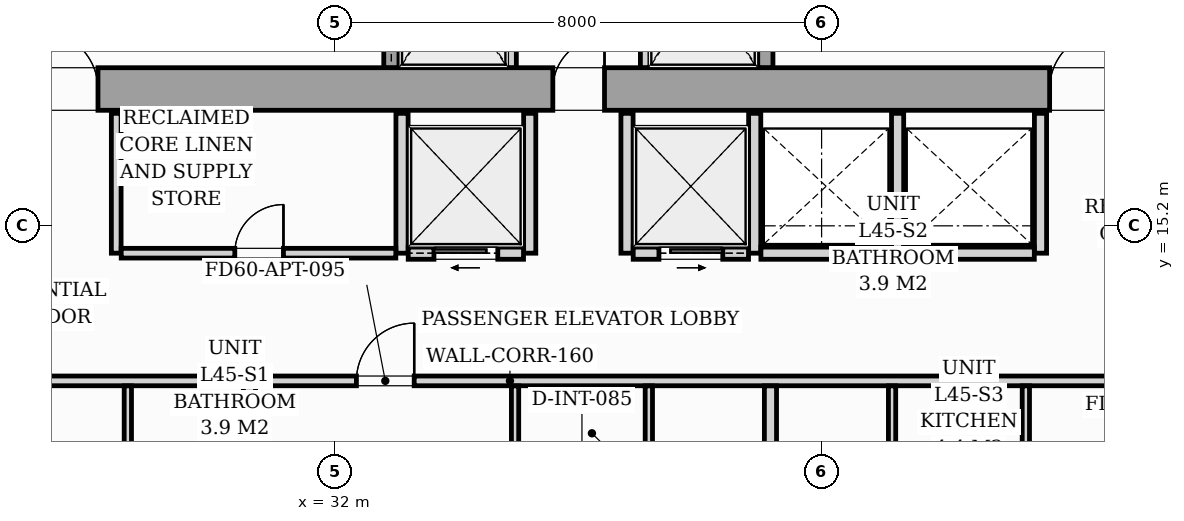
"""IFC4 building model, lengths in metres.
Left out: names, types, materials, properties, quantities, classifications, styles, units other than length and angle.
Written with IfcOpenShell. Run it as: python <this file> out.ifc"""

import sys

from ifc_helpers import new_model, si_unit, direction, frame, frame_2d, origin, origin_2d, place, context, subcontext, project, spatial, rectangle, i_section, extrude, source, transform, mapped, element, fill, save


model = new_model("IFC4")
c1 = context("Model", 3, precision=1e-05, world=origin(), true_north=direction((0.0, 1.0)))
c2 = subcontext(c1, "Body", "Model", "MODEL_VIEW")
j1 = project(units=[si_unit("LENGTHUNIT", "METRE"), si_unit("PLANEANGLEUNIT", "RADIAN")], contexts=[c1])
p1 = place(None, origin())
s1 = spatial("IfcSite", under=j1, at=p1, CompositionType="ELEMENT")
p2 = place(p1, origin())
s2 = spatial("IfcBuilding", under=s1, at=p2, CompositionType="ELEMENT")
p3 = place(p2, frame((0.0, 0.0, 156.6)))
s3 = spatial("IfcBuildingStorey", under=s2, at=p3, CompositionType="ELEMENT", Elevation=156.6)
m1 = source(origin(), c2, "Body", "SweptSolid", [
    extrude(i_section(OverallWidth=0.421, OverallDepth=0.465, WebThickness=0.045, FlangeThickness=0.073, FilletRadius=0.018, at=origin_2d()), origin(), (0.0, 0.0, 1.0), 3.196),
])
for number, where, z_axis, x_axis in (
    (1, (33.12, 17.4, 0.002), (0.0, 0.0, 1.0), (1.0, 0.0, 0.0)),
    (2, (38.88, 17.4, 0.002), (0.0, 0.0, 1.0), (1.0, 0.0, 0.0)),
):
    element("IfcColumn", number, at=place(p3, frame(where, z_axis=z_axis, x_axis=x_axis)), inside=s3, PredefinedType="PILASTER", context=c2, shape_type="MappedRepresentation", body=[
        mapped(m1, transform((0.0, 0.0, 0.0), scale=1.0)),
    ])
p4 = place(p3, frame((26.1, 17.45, 0.0), z_axis=(0.0, 0.0, 1.0), x_axis=(1.0, 0.0, 0.0)))
e3 = element("IfcWall", 3, at=p4, inside=s3, PredefinedType="SHEAR", context=c2, shape_type="SweptSolid", body=[
    extrude(rectangle(XDim=19.8, YDim=0.7, at=frame_2d((9.9, 0.0))), origin(), (0.0, 0.0, 1.0), 3.2),
])
p5 = place(p4, frame((1.05, 0.0, 0.0)))
e4 = element("IfcOpeningElement", 4, at=p5, cuts=e3, PredefinedType="OPENING", context=c2, shape_type="SweptSolid", body=[
    extrude(rectangle(XDim=0.95, YDim=2.06, at=frame_2d((0.475, 1.03))), frame((0.0, 0.36, 0.0), z_axis=(0.0, -1.0, 0.0), x_axis=(1.0, 0.0, 0.0)), (0.0, 0.0, 1.0), 0.72),
])
p6 = place(p4, frame((9.48, 0.0, 0.0)))
e5 = element("IfcOpeningElement", 5, at=p6, cuts=e3, PredefinedType="OPENING", context=c2, shape_type="SweptSolid", body=[
    extrude(rectangle(XDim=0.85, YDim=2.0, at=frame_2d((0.425, 1.0))), frame((0.0, 0.36, 0.0), z_axis=(0.0, -1.0, 0.0), x_axis=(1.0, 0.0, 0.0)), (0.0, 0.0, 1.0), 0.72),
])
p7 = place(p4, frame((17.65, 0.0, 0.0)))
e6 = element("IfcOpeningElement", 6, at=p7, cuts=e3, PredefinedType="OPENING", context=c2, shape_type="SweptSolid", body=[
    extrude(rectangle(XDim=0.95, YDim=2.06, at=frame_2d((0.475, 1.03))), frame((0.0, 0.36, 0.0), z_axis=(0.0, -1.0, 0.0), x_axis=(1.0, 0.0, 0.0)), (0.0, 0.0, 1.0), 0.72),
])
p8 = place(p3, frame((32.925, 17.802, 0.0), z_axis=(0.0, 0.0, 1.0), x_axis=(0.0, 1.0, 0.0)))
e7 = element("IfcWall", 7, at=p8, inside=s3, PredefinedType="SOLIDWALL", context=c2, shape_type="SweptSolid", body=[
    extrude(rectangle(XDim=2.646, YDim=0.25, at=frame_2d((1.323, 0.0))), origin(), (0.0, 0.0, 1.0), 3.2),
])
p9 = place(p8, frame((0.598, 0.0, 0.0)))
e8 = element("IfcOpeningElement", 8, at=p9, cuts=e7, PredefinedType="OPENING", context=c2, shape_type="SweptSolid", body=[
    extrude(rectangle(XDim=1.1, YDim=2.08, at=frame_2d((0.55, 1.04))), frame((0.0, 0.135, 0.0), z_axis=(0.0, -1.0, 0.0), x_axis=(1.0, 0.0, 0.0)), (0.0, 0.0, 1.0), 0.27),
])
for number, where, z_axis, x_axis in (
    (9, (34.9, 17.802, 0.0), (0.0, 0.0, 1.0), (0.0, 1.0, 0.0)),
    (10, (37.1, 17.802, 0.0), (0.0, 0.0, 1.0), (0.0, 1.0, 0.0)),
):
    element("IfcWall", number, at=place(p3, frame(where, z_axis=z_axis, x_axis=x_axis)), inside=s3, PredefinedType="PARTITIONING", context=c2, shape_type="SweptSolid", body=[
        extrude(rectangle(XDim=2.646, YDim=0.16, at=frame_2d((1.323, 0.0))), origin(), (0.0, 0.0, 1.0), 2.94),
    ])
p10 = place(p3, frame((39.075, 17.802, 0.0), z_axis=(0.0, 0.0, 1.0), x_axis=(0.0, 1.0, 0.0)))
e11 = element("IfcWall", 11, at=p10, inside=s3, PredefinedType="SOLIDWALL", context=c2, shape_type="SweptSolid", body=[
    extrude(rectangle(XDim=2.646, YDim=0.25, at=frame_2d((1.323, 0.0))), origin(), (0.0, 0.0, 1.0), 3.2),
])
p11 = place(p10, frame((0.598, 0.0, 0.0)))
e12 = element("IfcOpeningElement", 12, at=p11, cuts=e11, PredefinedType="OPENING", context=c2, shape_type="SweptSolid", body=[
    extrude(rectangle(XDim=1.1, YDim=2.08, at=frame_2d((0.55, 1.04))), frame((0.0, 0.135, 0.0), z_axis=(0.0, -1.0, 0.0), x_axis=(1.0, 0.0, 0.0)), (0.0, 0.0, 1.0), 0.27),
])
p12 = place(p3, frame((28.4, 14.75, 0.0), z_axis=(0.0, 0.0, 1.0), x_axis=(0.0, 1.0, 0.0)))
e13 = element("IfcWall", 13, at=p12, inside=s3, PredefinedType="PARTITIONING", context=c2, shape_type="SweptSolid", body=[
    extrude(rectangle(XDim=2.3, YDim=0.16, at=frame_2d((1.15, 0.0))), origin(), (0.0, 0.0, 1.0), 2.94),
])
p13 = place(p3, frame((33.1, 14.75, 0.0), z_axis=(0.0, 0.0, 1.0), x_axis=(0.0, 1.0, 0.0)))
e14 = element("IfcWall", 14, at=p13, inside=s3, PredefinedType="PARTITIONING", context=c2, shape_type="SweptSolid", body=[
    extrude(rectangle(XDim=2.3, YDim=0.2, at=frame_2d((1.15, 0.0))), origin(), (0.0, 0.0, 1.0), 2.94),
])
p14 = place(p3, frame((28.482, 14.75, 0.0), z_axis=(0.0, 0.0, 1.0), x_axis=(1.0, 0.0, 0.0)))
e15 = element("IfcWall", 15, at=p14, inside=s3, PredefinedType="PARTITIONING", context=c2, shape_type="SweptSolid", body=[
    extrude(rectangle(XDim=4.516, YDim=0.16, at=frame_2d((2.258, 0.0))), origin(), (0.0, 0.0, 1.0), 2.94),
])
p15 = place(p14, frame((1.868, 0.0, 0.0)))
e16 = element("IfcOpeningElement", 16, at=p15, cuts=e15, PredefinedType="OPENING", context=c2, shape_type="SweptSolid", body=[
    extrude(rectangle(XDim=0.8, YDim=2.05, at=frame_2d((0.4, 1.025))), frame((0.0, 0.09, 0.0), z_axis=(0.0, -1.0, 0.0), x_axis=(1.0, 0.0, 0.0)), (0.0, 0.0, 1.0), 0.18),
])
p16 = place(p3, frame((35.2, 14.75, 0.0), z_axis=(0.0, 0.0, 1.0), x_axis=(0.0, 1.0, 0.0)))
e17 = element("IfcWall", 17, at=p16, inside=s3, PredefinedType="PARTITIONING", context=c2, shape_type="SweptSolid", body=[
    extrude(rectangle(XDim=2.3, YDim=0.2, at=frame_2d((1.15, 0.0))), origin(), (0.0, 0.0, 1.0), 2.94),
])
p17 = place(p3, frame((33.202, 14.75, 0.0), z_axis=(0.0, 0.0, 1.0), x_axis=(1.0, 0.0, 0.0)))
e18 = element("IfcWall", 18, at=p17, inside=s3, PredefinedType="PARTITIONING", context=c2, shape_type="SweptSolid", body=[
    extrude(rectangle(XDim=1.896, YDim=0.2, at=frame_2d((0.948, 0.0))), origin(), (0.0, 0.0, 1.0), 2.94),
])
p18 = place(p17, frame((0.423, 0.0, 0.0)))
e19 = element("IfcOpeningElement", 19, at=p18, cuts=e18, PredefinedType="OPENING", context=c2, shape_type="SweptSolid", body=[
    extrude(rectangle(XDim=1.05, YDim=2.08, at=frame_2d((0.525, 1.04))), frame((0.0, 0.11, 0.0), z_axis=(0.0, -1.0, 0.0), x_axis=(1.0, 0.0, 0.0)), (0.0, 0.0, 1.0), 0.22),
])
for number, where, z_axis, x_axis in (
    (20, (36.8, 14.75, 0.0), (0.0, 0.0, 1.0), (0.0, 1.0, 0.0)),
    (21, (38.9, 14.75, 0.0), (0.0, 0.0, 1.0), (0.0, 1.0, 0.0)),
):
    element("IfcWall", number, at=place(p3, frame(where, z_axis=z_axis, x_axis=x_axis)), inside=s3, PredefinedType="PARTITIONING", context=c2, shape_type="SweptSolid", body=[
        extrude(rectangle(XDim=2.3, YDim=0.2, at=frame_2d((1.15, 0.0))), origin(), (0.0, 0.0, 1.0), 2.94),
    ])
p19 = place(p3, frame((36.902, 14.75, 0.0), z_axis=(0.0, 0.0, 1.0), x_axis=(1.0, 0.0, 0.0)))
e22 = element("IfcWall", 22, at=p19, inside=s3, PredefinedType="PARTITIONING", context=c2, shape_type="SweptSolid", body=[
    extrude(rectangle(XDim=1.896, YDim=0.2, at=frame_2d((0.948, 0.0))), origin(), (0.0, 0.0, 1.0), 2.94),
])
p20 = place(p19, frame((0.423, 0.0, 0.0)))
e23 = element("IfcOpeningElement", 23, at=p20, cuts=e22, PredefinedType="OPENING", context=c2, shape_type="SweptSolid", body=[
    extrude(rectangle(XDim=1.05, YDim=2.08, at=frame_2d((0.525, 1.04))), frame((0.0, 0.11, 0.0), z_axis=(0.0, -1.0, 0.0), x_axis=(1.0, 0.0, 0.0)), (0.0, 0.0, 1.0), 0.22),
])
for number, where, z_axis, x_axis in (
    (24, (41.25, 14.75, 0.0), (0.0, 0.0, 1.0), (0.0, 1.0, 0.0)),
    (25, (43.6, 14.75, 0.0), (0.0, 0.0, 1.0), (0.0, 1.0, 0.0)),
):
    element("IfcWall", number, at=place(p3, frame(where, z_axis=z_axis, x_axis=x_axis)), inside=s3, PredefinedType="PARTITIONING", context=c2, shape_type="SweptSolid", body=[
        extrude(rectangle(XDim=2.3, YDim=0.2, at=frame_2d((1.15, 0.0))), origin(), (0.0, 0.0, 1.0), 2.94),
    ])
for number, where, z_axis, x_axis in (
    (26, (39.002, 14.75, 0.0), (0.0, 0.0, 1.0), (1.0, 0.0, 0.0)),
    (27, (41.352, 14.75, 0.0), (0.0, 0.0, 1.0), (1.0, 0.0, 0.0)),
):
    element("IfcWall", number, at=place(p3, frame(where, z_axis=z_axis, x_axis=x_axis)), inside=s3, PredefinedType="PARTITIONING", context=c2, shape_type="SweptSolid", body=[
        extrude(rectangle(XDim=2.146, YDim=0.2, at=frame_2d((1.073, 0.0))), origin(), (0.0, 0.0, 1.0), 2.94),
    ])
p21 = place(p3, frame((22.05, 12.65, 0.0), z_axis=(0.0, 0.0, 1.0), x_axis=(1.0, 0.0, 0.0)))
e28 = element("IfcWall", 28, at=p21, inside=s3, PredefinedType="PARTITIONING", context=c2, shape_type="SweptSolid", body=[
    extrude(rectangle(XDim=25.65, YDim=0.16, at=frame_2d((12.825, 0.0))), origin(), (0.0, 0.0, 1.0), 2.94),
])
p22 = place(p21, frame((1.736, 0.0, 0.0)))
e29 = element("IfcOpeningElement", 29, at=p22, cuts=e28, PredefinedType="OPENING", context=c2, shape_type="SweptSolid", body=[
    extrude(rectangle(XDim=0.95, YDim=2.06, at=frame_2d((0.475, 1.03))), frame((0.0, 0.09, 0.0), z_axis=(0.0, -1.0, 0.0), x_axis=(1.0, 0.0, 0.0)), (0.0, 0.0, 1.0), 0.18),
])
p23 = place(p21, frame((10.3, 0.0, 0.0)))
e30 = element("IfcOpeningElement", 30, at=p23, cuts=e28, PredefinedType="OPENING", context=c2, shape_type="SweptSolid", body=[
    extrude(rectangle(XDim=0.95, YDim=2.06, at=frame_2d((0.475, 1.03))), frame((0.0, 0.09, 0.0), z_axis=(0.0, -1.0, 0.0), x_axis=(1.0, 0.0, 0.0)), (0.0, 0.0, 1.0), 0.18),
])
p24 = place(p21, frame((22.965, 0.0, 0.0)))
e31 = element("IfcOpeningElement", 31, at=p24, cuts=e28, PredefinedType="OPENING", context=c2, shape_type="SweptSolid", body=[
    extrude(rectangle(XDim=0.95, YDim=2.06, at=frame_2d((0.475, 1.03))), frame((0.0, 0.09, 0.0), z_axis=(0.0, -1.0, 0.0), x_axis=(1.0, 0.0, 0.0)), (0.0, 0.0, 1.0), 0.18),
])
p25 = place(p3, frame((28.591, 10.462, 0.0), z_axis=(0.0, 0.0, 1.0), x_axis=(0.0, 1.0, 0.0)))
e32 = element("IfcWall", 32, at=p25, inside=s3, PredefinedType="PARTITIONING", context=c2, shape_type="SweptSolid", body=[
    extrude(rectangle(XDim=2.106, YDim=0.12, at=frame_2d((1.053, 0.0))), origin(), (0.0, 0.0, 1.0), 2.94),
])
p26 = place(p3, frame((30.591, 10.462, 0.0), z_axis=(0.0, 0.0, 1.0), x_axis=(0.0, 1.0, 0.0)))
e33 = element("IfcWall", 33, at=p26, inside=s3, PredefinedType="PARTITIONING", context=c2, shape_type="SweptSolid", body=[
    extrude(rectangle(XDim=2.106, YDim=0.2, at=frame_2d((1.053, 0.0))), origin(), (0.0, 0.0, 1.0), 2.94),
])
for number, where, z_axis, x_axis in (
    (34, (34.959, 10.462, 0.0), (0.0, 0.0, 1.0), (0.0, 1.0, 0.0)),
    (35, (37.159, 10.462, 0.0), (0.0, 0.0, 1.0), (0.0, 1.0, 0.0)),
):
    element("IfcWall", number, at=place(p3, frame(where, z_axis=z_axis, x_axis=x_axis)), inside=s3, PredefinedType="PARTITIONING", context=c2, shape_type="SweptSolid", body=[
        extrude(rectangle(XDim=2.106, YDim=0.12, at=frame_2d((1.053, 0.0))), origin(), (0.0, 0.0, 1.0), 2.94),
    ])
p27 = place(p3, frame((39.159, 10.462, 0.0), z_axis=(0.0, 0.0, 1.0), x_axis=(0.0, 1.0, 0.0)))
e36 = element("IfcWall", 36, at=p27, inside=s3, PredefinedType="PARTITIONING", context=c2, shape_type="SweptSolid", body=[
    extrude(rectangle(XDim=2.106, YDim=0.2, at=frame_2d((1.053, 0.0))), origin(), (0.0, 0.0, 1.0), 2.94),
])
for number, where, z_axis, x_axis in (
    (37, (43.359, 10.462, 0.0), (0.0, 0.0, 1.0), (0.0, 1.0, 0.0)),
    (38, (41.159, 10.462, 0.0), (0.0, 0.0, 1.0), (0.0, 1.0, 0.0)),
):
    element("IfcWall", number, at=place(p3, frame(where, z_axis=z_axis, x_axis=x_axis)), inside=s3, PredefinedType="PARTITIONING", context=c2, shape_type="SweptSolid", body=[
        extrude(rectangle(XDim=2.106, YDim=0.12, at=frame_2d((1.053, 0.0))), origin(), (0.0, 0.0, 1.0), 2.94),
    ])
m2 = source(origin(), c2, "Body", "SweptSolid", [
    extrude(rectangle(XDim=0.95, YDim=2.06, at=frame_2d((0.475, 1.03))), frame((0.0, 0.025, 0.0), z_axis=(0.0, -1.0, 0.0), x_axis=(1.0, 0.0, 0.0)), (0.0, 0.0, 1.0), 0.05),
])
p28 = place(p5, origin())
e39 = element("IfcDoor", 39, at=p28, inside=s3, OperationType="SINGLE_SWING_LEFT", PredefinedType="DOOR", context=c2, shape_type="MappedRepresentation", body=[
    mapped(m2, transform((0.0, 0.0, 0.0), scale=1.0)),
])
fill(e4, e39)
m3 = source(origin(), c2, "Body", "SweptSolid", [
    extrude(rectangle(XDim=0.85, YDim=2.0, at=frame_2d((0.425, 1.0))), frame((0.0, 0.025, 0.0), z_axis=(0.0, -1.0, 0.0), x_axis=(1.0, 0.0, 0.0)), (0.0, 0.0, 1.0), 0.05),
])
p29 = place(p6, origin())
e40 = element("IfcDoor", 40, at=p29, inside=s3, OperationType="SINGLE_SWING_RIGHT", PredefinedType="DOOR", context=c2, shape_type="MappedRepresentation", body=[
    mapped(m3, transform((0.0, 0.0, 0.0), scale=1.0)),
])
fill(e5, e40)
p30 = place(p7, origin())
e41 = element("IfcDoor", 41, at=p30, inside=s3, OperationType="SINGLE_SWING_RIGHT", PredefinedType="DOOR", context=c2, shape_type="MappedRepresentation", body=[
    mapped(m2, transform((0.0, 0.0, 0.0), scale=1.0)),
])
fill(e6, e41)
m4 = source(origin(), c2, "Body", "SweptSolid", [
    extrude(rectangle(XDim=0.8, YDim=2.05, at=frame_2d((0.4, 1.025))), frame((0.0, 0.025, 0.0), z_axis=(0.0, -1.0, 0.0), x_axis=(1.0, 0.0, 0.0)), (0.0, 0.0, 1.0), 0.05),
])
p31 = place(p15, origin())
e42 = element("IfcDoor", 42, at=p31, inside=s3, OperationType="SINGLE_SWING_RIGHT", PredefinedType="DOOR", context=c2, shape_type="MappedRepresentation", body=[
    mapped(m4, transform((0.0, 0.0, 0.0), scale=1.0)),
])
fill(e16, e42)
m5 = source(origin(), c2, "Body", "SweptSolid", [
    extrude(rectangle(XDim=1.05, YDim=2.08, at=frame_2d((0.525, 1.04))), frame((0.0, 0.025, 0.0), z_axis=(0.0, -1.0, 0.0), x_axis=(1.0, 0.0, 0.0)), (0.0, 0.0, 1.0), 0.05),
])
p32 = place(p18, origin())
e43 = element("IfcDoor", 43, at=p32, inside=s3, OperationType="SLIDING_TO_LEFT", PredefinedType="DOOR", context=c2, shape_type="MappedRepresentation", body=[
    mapped(m5, transform((0.0, 0.0, 0.0), scale=1.0)),
])
fill(e19, e43)
p33 = place(p20, origin())
e44 = element("IfcDoor", 44, at=p33, inside=s3, OperationType="SLIDING_TO_RIGHT", PredefinedType="DOOR", context=c2, shape_type="MappedRepresentation", body=[
    mapped(m5, transform((0.0, 0.0, 0.0), scale=1.0)),
])
fill(e23, e44)
m6 = source(origin(), c2, "Body", "SweptSolid", [
    extrude(rectangle(XDim=0.95, YDim=2.06, at=frame_2d((0.475, 1.03))), frame((0.0, 0.025, 0.0), z_axis=(0.0, -1.0, 0.0), x_axis=(1.0, 0.0, 0.0)), (0.0, 0.0, 1.0), 0.05),
])
p34 = place(p23, origin())
e45 = element("IfcDoor", 45, at=p34, inside=s3, OperationType="SINGLE_SWING_RIGHT", PredefinedType="DOOR", context=c2, shape_type="MappedRepresentation", body=[
    mapped(m6, transform((0.0, 0.0, 0.0), scale=1.0)),
])
fill(e30, e45)
save(model, sys.argv[1])
